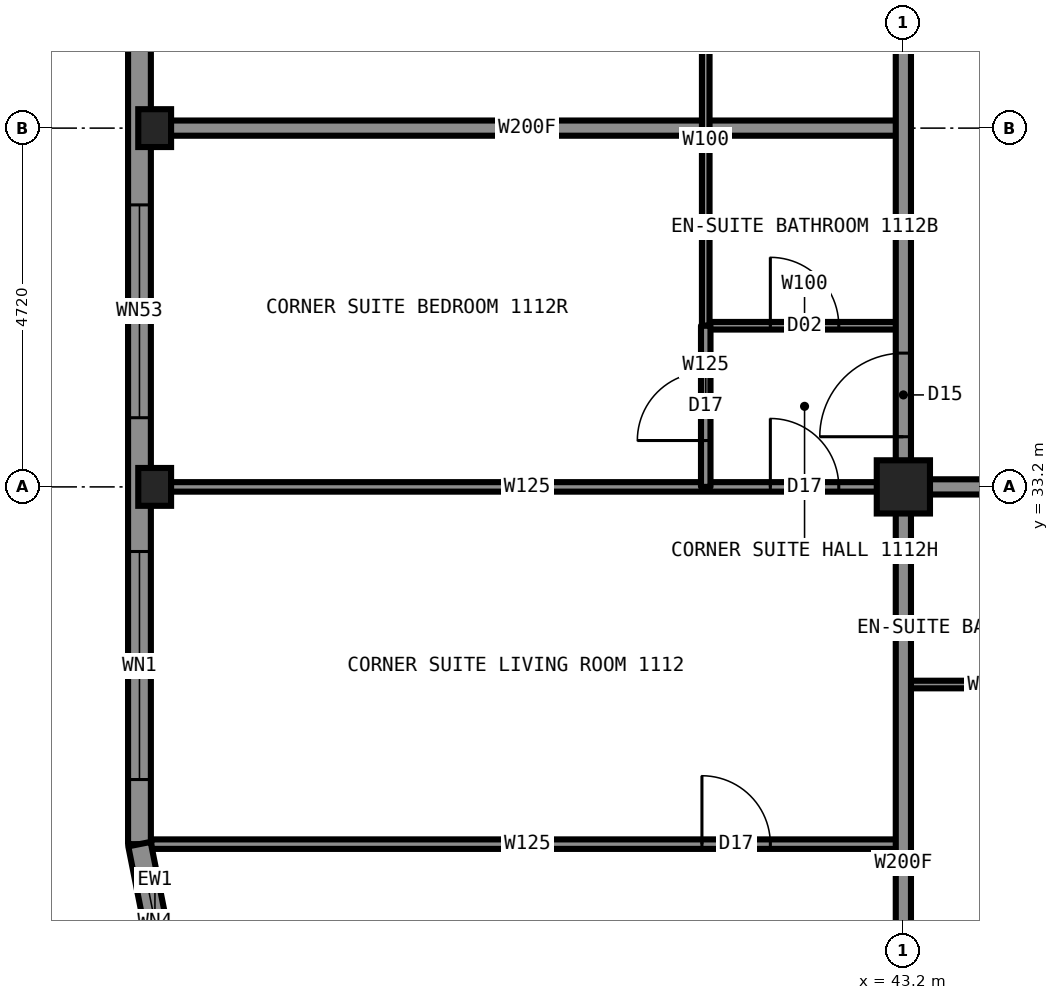
"""IFC4 building model, lengths in metres.
Left out: names, types, materials, properties, quantities, classifications, styles, units other than length and angle.
Written with IfcOpenShell. Run it as: python <this file> out.ifc"""

import sys

from ifc_helpers import new_model, si_unit, direction, frame, frame_2d, origin, origin_2d, place, context, subcontext, project, spatial, rectangle, hollow_rectangle, i_section, extrude, element, fill, save


model = new_model("IFC4")
c1 = context("Model", 3, precision=1e-05, world=origin(), true_north=direction((0.0, 1.0)))
c2 = subcontext(c1, "Body", "Model", "MODEL_VIEW")
j1 = project(units=[si_unit("LENGTHUNIT", "METRE"), si_unit("PLANEANGLEUNIT", "RADIAN")], contexts=[c1])
p1 = place(None, origin())
s1 = spatial("IfcSite", under=j1, at=p1, CompositionType="ELEMENT")
p2 = place(p1, origin())
s2 = spatial("IfcBuilding", under=s1, at=p2, CompositionType="ELEMENT")
p3 = place(p2, frame((0.0, 0.0, 39.0)))
s3 = spatial("IfcBuildingStorey", under=s2, at=p3, CompositionType="ELEMENT", Elevation=39.0)
for number, where, z_axis, x_axis in (
    (1, (33.35, 33.2, 0.0), (0.0, 0.0, 1.0), (1.0, 0.0, 0.0)),
    (2, (33.35, 37.92, 0.0), (0.0, 0.0, 1.0), (1.0, 0.0, 0.0)),
):
    element("IfcColumn", number, at=place(p3, frame(where, z_axis=z_axis, x_axis=x_axis)), inside=s3, PredefinedType="COLUMN", context=c2, shape_type="SweptSolid", body=[
        extrude(i_section(OverallWidth=0.432, OverallDepth=0.498, WebThickness=0.056, FlangeThickness=0.089, at=origin_2d()), origin(), (0.0, 0.0, 1.0), 3.5),
    ])
p4 = place(p3, frame((43.2, 33.2, 0.0), z_axis=(0.0, 0.0, 1.0), x_axis=(1.0, 0.0, 0.0)))
e3 = element("IfcColumn", 3, at=p4, inside=s3, PredefinedType="COLUMN", context=c2, shape_type="SweptSolid", body=[
    extrude(hollow_rectangle(XDim=0.7, YDim=0.7, WallThickness=0.06, at=origin_2d()), origin(), (0.0, 0.0, 1.0), 3.5),
])
p5 = place(p3, frame((43.2, 33.2, 0.0), z_axis=(0.0, 0.0, 1.0), x_axis=(1.0, 0.0, 0.0)))
e4 = element("IfcWall", 4, at=p5, inside=s3, PredefinedType="PARTITIONING", context=c2, shape_type="SweptSolid", body=[
    extrude(rectangle(XDim=23.6, YDim=0.2, at=frame_2d((11.8, 0.0))), origin(), (0.0, 0.0, 1.0), 3.33),
])
p6 = place(p5, frame((2.55, 0.0, 0.0)))
e5 = element("IfcOpeningElement", 5, at=p6, cuts=e4, PredefinedType="OPENING", context=c2, shape_type="SweptSolid", body=[
    extrude(rectangle(XDim=1.0, YDim=2.2, at=frame_2d((0.5, 1.1))), frame((0.0, 0.11, 0.0), z_axis=(0.0, -1.0, 0.0), x_axis=(1.0, 0.0, 0.0)), (0.0, 0.0, 1.0), 0.22),
])
p7 = place(p5, frame((6.57, 0.0, 0.0)))
e6 = element("IfcOpeningElement", 6, at=p7, cuts=e4, PredefinedType="OPENING", context=c2, shape_type="SweptSolid", body=[
    extrude(rectangle(XDim=1.1, YDim=2.2, at=frame_2d((0.55, 1.1))), frame((0.0, 0.11, 0.0), z_axis=(0.0, -1.0, 0.0), x_axis=(1.0, 0.0, 0.0)), (0.0, 0.0, 1.0), 0.22),
])
p8 = place(p5, frame((20.34, 0.0, 0.0)))
e7 = element("IfcOpeningElement", 7, at=p8, cuts=e4, PredefinedType="OPENING", context=c2, shape_type="SweptSolid", body=[
    extrude(rectangle(XDim=1.0, YDim=2.2, at=frame_2d((0.5, 1.1))), frame((0.0, 0.11, 0.0), z_axis=(0.0, -1.0, 0.0), x_axis=(1.0, 0.0, 0.0)), (0.0, 0.0, 1.0), 0.22),
])
p9 = place(p3, frame((33.3, 33.2, 0.0), z_axis=(0.0, 0.0, 1.0), x_axis=(1.0, 0.0, 0.0)))
e8 = element("IfcWall", 8, at=p9, inside=s3, PredefinedType="PARTITIONING", context=c2, shape_type="SweptSolid", body=[
    extrude(rectangle(XDim=9.9, YDim=0.125, at=frame_2d((4.95, 0.0))), origin(), (0.0, 0.0, 1.0), 2.573),
])
p10 = place(p9, frame((8.15, 0.0, 0.0)))
e9 = element("IfcOpeningElement", 9, at=p10, cuts=e8, PredefinedType="OPENING", context=c2, shape_type="SweptSolid", body=[
    extrude(rectangle(XDim=0.9, YDim=2.2, at=frame_2d((0.45, 1.1))), frame((0.0, 0.073, 0.0), z_axis=(0.0, -1.0, 0.0), x_axis=(1.0, 0.0, 0.0)), (0.0, 0.0, 1.0), 0.145),
])
p11 = place(p3, frame((43.2, 30.6, 0.0), z_axis=(0.0, 0.0, 1.0), x_axis=(1.0, 0.0, 0.0)))
e10 = element("IfcWall", 10, at=p11, inside=s3, PredefinedType="PARTITIONING", context=c2, shape_type="SweptSolid", body=[
    extrude(rectangle(XDim=2.3, YDim=0.1, at=frame_2d((1.15, 0.0))), origin(), (0.0, 0.0, 1.0), 3.33),
])
p12 = place(p3, frame((33.306, 28.5, 0.0), z_axis=(0.0, 0.0, 1.0), x_axis=(1.0, 0.0, 0.0)))
e11 = element("IfcWall", 11, at=p12, inside=s3, PredefinedType="PARTITIONING", context=c2, shape_type="SweptSolid", body=[
    extrude(rectangle(XDim=9.894, YDim=0.125, at=frame_2d((4.947, 0.0))), origin(), (0.0, 0.0, 1.0), 3.33),
])
p13 = place(p12, frame((7.244, 0.0, 0.0)))
e12 = element("IfcOpeningElement", 12, at=p13, cuts=e11, PredefinedType="OPENING", context=c2, shape_type="SweptSolid", body=[
    extrude(rectangle(XDim=0.9, YDim=2.2, at=frame_2d((0.45, 1.1))), frame((0.0, 0.073, 0.0), z_axis=(0.0, -1.0, 0.0), x_axis=(1.0, 0.0, 0.0)), (0.0, 0.0, 1.0), 0.145),
])
p14 = place(p3, frame((33.3, 37.92, 0.0), z_axis=(0.0, 0.0, 1.0), x_axis=(1.0, 0.0, 0.0)))
e13 = element("IfcWall", 13, at=p14, inside=s3, PredefinedType="PARTITIONING", context=c2, shape_type="SweptSolid", body=[
    extrude(rectangle(XDim=9.9, YDim=0.2, at=frame_2d((4.95, 0.0))), origin(), (0.0, 0.0, 1.0), 2.573),
])
p15 = place(p3, frame((40.6, 35.32, 0.0), z_axis=(0.0, 0.0, 1.0), x_axis=(1.0, 0.0, 0.0)))
e14 = element("IfcWall", 14, at=p15, inside=s3, PredefinedType="PARTITIONING", context=c2, shape_type="SweptSolid", body=[
    extrude(rectangle(XDim=2.6, YDim=0.1, at=frame_2d((1.3, 0.0))), origin(), (0.0, 0.0, 1.0), 3.33),
])
p16 = place(p15, frame((0.85, 0.0, 0.0)))
e15 = element("IfcOpeningElement", 15, at=p16, cuts=e14, PredefinedType="OPENING", context=c2, shape_type="SweptSolid", body=[
    extrude(rectangle(XDim=0.9, YDim=2.1, at=frame_2d((0.45, 1.05))), frame((0.0, 0.06, 0.0), z_axis=(0.0, -1.0, 0.0), x_axis=(1.0, 0.0, 0.0)), (0.0, 0.0, 1.0), 0.12),
])
p17 = place(p3, frame((43.2, 33.2, 0.0), z_axis=(0.0, 0.0, 1.0), x_axis=(0.0, 1.0, 0.0)))
e16 = element("IfcWall", 16, at=p17, inside=s3, PredefinedType="PARTITIONING", context=c2, shape_type="SweptSolid", body=[
    extrude(rectangle(XDim=23.58, YDim=0.2, at=frame_2d((11.79, 0.0))), origin(), (0.0, 0.0, 1.0), 3.33),
])
p18 = place(p17, frame((7.27, 0.0, 0.0)))
e17 = element("IfcOpeningElement", 17, at=p18, cuts=e16, PredefinedType="OPENING", context=c2, shape_type="SweptSolid", body=[
    extrude(rectangle(XDim=1.0, YDim=2.2, at=frame_2d((0.5, 1.1))), frame((0.0, 0.11, 0.0), z_axis=(0.0, -1.0, 0.0), x_axis=(1.0, 0.0, 0.0)), (0.0, 0.0, 1.0), 0.22),
])
p19 = place(p17, frame((12.44, 0.0, 0.0)))
e18 = element("IfcOpeningElement", 18, at=p19, cuts=e16, PredefinedType="OPENING", context=c2, shape_type="SweptSolid", body=[
    extrude(rectangle(XDim=1.0, YDim=2.2, at=frame_2d((0.5, 1.1))), frame((0.0, 0.11, 0.0), z_axis=(0.0, -1.0, 0.0), x_axis=(1.0, 0.0, 0.0)), (0.0, 0.0, 1.0), 0.22),
])
p20 = place(p17, frame((21.84, 0.0, 0.0)))
e19 = element("IfcOpeningElement", 19, at=p20, cuts=e16, PredefinedType="OPENING", context=c2, shape_type="SweptSolid", body=[
    extrude(rectangle(XDim=1.1, YDim=2.2, at=frame_2d((0.55, 1.1))), frame((0.0, 0.11, 0.0), z_axis=(0.0, -1.0, 0.0), x_axis=(1.0, 0.0, 0.0)), (0.0, 0.0, 1.0), 0.22),
])
p21 = place(p17, frame((0.66, 0.0, 0.0)))
e20 = element("IfcOpeningElement", 20, at=p21, cuts=e16, PredefinedType="OPENING", context=c2, shape_type="SweptSolid", body=[
    extrude(rectangle(XDim=1.1, YDim=2.2, at=frame_2d((0.55, 1.1))), frame((0.0, 0.11, 0.0), z_axis=(0.0, -1.0, 0.0), x_axis=(1.0, 0.0, 0.0)), (0.0, 0.0, 1.0), 0.22),
])
p22 = place(p3, frame((43.2, 23.3, 0.0), z_axis=(0.0, 0.0, 1.0), x_axis=(0.0, 1.0, 0.0)))
e21 = element("IfcWall", 21, at=p22, inside=s3, PredefinedType="PARTITIONING", context=c2, shape_type="SweptSolid", body=[
    extrude(rectangle(XDim=9.9, YDim=0.2, at=frame_2d((4.95, 0.0))), origin(), (0.0, 0.0, 1.0), 2.573),
])
p23 = place(p3, frame((40.6, 35.32, 0.0), z_axis=(0.0, 0.0, 1.0), x_axis=(0.0, 1.0, 0.0)))
e22 = element("IfcWall", 22, at=p23, inside=s3, PredefinedType="PARTITIONING", context=c2, shape_type="SweptSolid", body=[
    extrude(rectangle(XDim=4.9, YDim=0.1, at=frame_2d((2.45, 0.0))), origin(), (0.0, 0.0, 1.0), 3.33),
])
p24 = place(p3, frame((40.6, 33.2, 0.0), z_axis=(0.0, 0.0, 1.0), x_axis=(0.0, 1.0, 0.0)))
e23 = element("IfcWall", 23, at=p24, inside=s3, PredefinedType="PARTITIONING", context=c2, shape_type="SweptSolid", body=[
    extrude(rectangle(XDim=2.12, YDim=0.125, at=frame_2d((1.06, 0.0))), origin(), (0.0, 0.0, 1.0), 3.33),
])
p25 = place(p24, frame((0.61, 0.0, 0.0)))
e24 = element("IfcOpeningElement", 24, at=p25, cuts=e23, PredefinedType="OPENING", context=c2, shape_type="SweptSolid", body=[
    extrude(rectangle(XDim=0.9, YDim=2.2, at=frame_2d((0.45, 1.1))), frame((0.0, 0.073, 0.0), z_axis=(0.0, -1.0, 0.0), x_axis=(1.0, 0.0, 0.0)), (0.0, 0.0, 1.0), 0.145),
])
p26 = place(p3, frame((33.15, 61.5, 0.0), z_axis=(0.0, 0.0, 1.0), x_axis=(0.0, -1.0, 0.0)))
e25 = element("IfcWall", 25, at=p26, inside=s3, PredefinedType="SOLIDWALL", context=c2, shape_type="SweptSolid", body=[
    extrude(rectangle(XDim=33.0, YDim=0.3, at=frame_2d((16.5, 0.0))), origin(), (0.0, 0.0, 1.0), 2.83),
])
p27 = place(p26, frame((0.85, 0.0, 0.5)))
e26 = element("IfcOpeningElement", 26, at=p27, cuts=e25, PredefinedType="OPENING", context=c2, shape_type="SweptSolid", body=[
    extrude(rectangle(XDim=2.5, YDim=2.0, at=frame_2d((1.25, 1.0))), frame((0.0, 0.16, 0.0), z_axis=(0.0, -1.0, 0.0), x_axis=(1.0, 0.0, 0.0)), (0.0, 0.0, 1.0), 0.32),
])
p28 = place(p26, frame((6.61, 0.0, 0.5)))
e27 = element("IfcOpeningElement", 27, at=p28, cuts=e25, PredefinedType="OPENING", context=c2, shape_type="SweptSolid", body=[
    extrude(rectangle(XDim=1.9, YDim=1.9, at=frame_2d((0.95, 0.95))), frame((0.0, 0.16, 0.0), z_axis=(0.0, -1.0, 0.0), x_axis=(1.0, 0.0, 0.0)), (0.0, 0.0, 1.0), 0.32),
])
p29 = place(p26, frame((10.28, 0.0, 0.5)))
e28 = element("IfcOpeningElement", 28, at=p29, cuts=e25, PredefinedType="OPENING", context=c2, shape_type="SweptSolid", body=[
    extrude(rectangle(XDim=3.0, YDim=2.0, at=frame_2d((1.5, 1.0))), frame((0.0, 0.16, 0.0), z_axis=(0.0, -1.0, 0.0), x_axis=(1.0, 0.0, 0.0)), (0.0, 0.0, 1.0), 0.32),
])
p30 = place(p26, frame((15.0, 0.0, 0.5)))
e29 = element("IfcOpeningElement", 29, at=p30, cuts=e25, PredefinedType="OPENING", context=c2, shape_type="SweptSolid", body=[
    extrude(rectangle(XDim=3.0, YDim=2.0, at=frame_2d((1.5, 1.0))), frame((0.0, 0.16, 0.0), z_axis=(0.0, -1.0, 0.0), x_axis=(1.0, 0.0, 0.0)), (0.0, 0.0, 1.0), 0.32),
])
p31 = place(p26, frame((19.72, 0.0, 0.5)))
e30 = element("IfcOpeningElement", 30, at=p31, cuts=e25, PredefinedType="OPENING", context=c2, shape_type="SweptSolid", body=[
    extrude(rectangle(XDim=3.0, YDim=2.0, at=frame_2d((1.5, 1.0))), frame((0.0, 0.16, 0.0), z_axis=(0.0, -1.0, 0.0), x_axis=(1.0, 0.0, 0.0)), (0.0, 0.0, 1.0), 0.32),
])
p32 = place(p26, frame((24.44, 0.0, 0.5)))
e31 = element("IfcOpeningElement", 31, at=p32, cuts=e25, PredefinedType="OPENING", context=c2, shape_type="SweptSolid", body=[
    extrude(rectangle(XDim=1.9, YDim=1.9, at=frame_2d((0.95, 0.95))), frame((0.0, 0.16, 0.0), z_axis=(0.0, -1.0, 0.0), x_axis=(1.0, 0.0, 0.0)), (0.0, 0.0, 1.0), 0.32),
])
p33 = place(p26, frame((29.6, 0.0, 0.5)))
e32 = element("IfcOpeningElement", 32, at=p33, cuts=e25, PredefinedType="OPENING", context=c2, shape_type="SweptSolid", body=[
    extrude(rectangle(XDim=2.5, YDim=2.0, at=frame_2d((1.25, 1.0))), frame((0.0, 0.16, 0.0), z_axis=(0.0, -1.0, 0.0), x_axis=(1.0, 0.0, 0.0)), (0.0, 0.0, 1.0), 0.32),
])
p34 = place(p26, frame((5.91, 0.0, 0.5)))
e33 = element("IfcOpeningElement", 33, at=p34, cuts=e25, PredefinedType="OPENING", context=c2, shape_type="SweptSolid", body=[
    extrude(rectangle(XDim=0.7, YDim=1.0, at=frame_2d((0.35, 0.5))), frame((0.0, 0.16, 0.0), z_axis=(0.0, -1.0, 0.0), x_axis=(1.0, 0.0, 0.0)), (0.0, 0.0, 1.0), 0.32),
])
p35 = place(p26, frame((26.39, 0.0, 0.5)))
e34 = element("IfcOpeningElement", 34, at=p35, cuts=e25, PredefinedType="OPENING", context=c2, shape_type="SweptSolid", body=[
    extrude(rectangle(XDim=0.7, YDim=1.0, at=frame_2d((0.35, 0.5))), frame((0.0, 0.16, 0.0), z_axis=(0.0, -1.0, 0.0), x_axis=(1.0, 0.0, 0.0)), (0.0, 0.0, 1.0), 0.32),
])
p36 = place(p3, frame((33.15, 28.5, 0.0), z_axis=(0.0, 0.0, 1.0), x_axis=(0.195081421501, -0.980787050784, 0.0)))
e35 = element("IfcWall", 35, at=p36, inside=s3, PredefinedType="SOLIDWALL", context=c2, shape_type="SweptSolid", body=[
    extrude(rectangle(XDim=2.087, YDim=0.3, at=frame_2d((1.044, 0.0))), origin(), (0.0, 0.0, 1.0), 3.33),
])
p37 = place(p36, frame((0.444, 0.0, 0.5)))
e36 = element("IfcOpeningElement", 36, at=p37, cuts=e35, PredefinedType="OPENING", context=c2, shape_type="SweptSolid", body=[
    extrude(rectangle(XDim=1.2, YDim=2.0, at=frame_2d((0.6, 1.0))), frame((0.0, 0.16, 0.0), z_axis=(0.0, -1.0, 0.0), x_axis=(1.0, 0.0, 0.0)), (0.0, 0.0, 1.0), 0.32),
])
p38 = place(p10, origin())
e37 = element("IfcDoor", 37, at=p38, inside=s3, OperationType="SINGLE_SWING_LEFT", PredefinedType="DOOR", context=c2, shape_type="SweptSolid", body=[
    extrude(rectangle(XDim=0.9, YDim=2.2, at=frame_2d((0.45, 1.1))), frame((0.0, 0.025, 0.0), z_axis=(0.0, -1.0, 0.0), x_axis=(1.0, 0.0, 0.0)), (0.0, 0.0, 1.0), 0.05),
])
fill(e9, e37)
p39 = place(p16, origin())
e38 = element("IfcDoor", 38, at=p39, inside=s3, OperationType="SINGLE_SWING_RIGHT", PredefinedType="DOOR", context=c2, shape_type="SweptSolid", body=[
    extrude(rectangle(XDim=0.9, YDim=2.1, at=frame_2d((0.45, 1.05))), frame((0.0, 0.025, 0.0), z_axis=(0.0, -1.0, 0.0), x_axis=(1.0, 0.0, 0.0)), (0.0, 0.0, 1.0), 0.05),
])
fill(e15, e38)
p40 = place(p21, origin())
e39 = element("IfcDoor", 39, at=p40, inside=s3, OperationType="SINGLE_SWING_LEFT", PredefinedType="DOOR", context=c2, shape_type="SweptSolid", body=[
    extrude(rectangle(XDim=1.1, YDim=2.2, at=frame_2d((0.55, 1.1))), frame((0.0, 0.025, 0.0), z_axis=(0.0, -1.0, 0.0), x_axis=(1.0, 0.0, 0.0)), (0.0, 0.0, 1.0), 0.05),
])
fill(e20, e39)
p41 = place(p13, origin())
e40 = element("IfcDoor", 40, at=p41, inside=s3, OperationType="SINGLE_SWING_LEFT", PredefinedType="DOOR", context=c2, shape_type="SweptSolid", body=[
    extrude(rectangle(XDim=0.9, YDim=2.2, at=frame_2d((0.45, 1.1))), frame((0.0, 0.025, 0.0), z_axis=(0.0, -1.0, 0.0), x_axis=(1.0, 0.0, 0.0)), (0.0, 0.0, 1.0), 0.05),
])
fill(e12, e40)
p42 = place(p25, origin())
e41 = element("IfcDoor", 41, at=p42, inside=s3, OperationType="SINGLE_SWING_LEFT", PredefinedType="DOOR", context=c2, shape_type="SweptSolid", body=[
    extrude(rectangle(XDim=0.9, YDim=2.2, at=frame_2d((0.45, 1.1))), frame((0.0, 0.025, 0.0), z_axis=(0.0, -1.0, 0.0), x_axis=(1.0, 0.0, 0.0)), (0.0, 0.0, 1.0), 0.05),
])
fill(e24, e41)
p43 = place(p31, origin())
e42 = element("IfcWindow", 42, at=p43, inside=s3, PartitioningType="SINGLE_PANEL", PredefinedType="WINDOW", context=c2, shape_type="SweptSolid", body=[
    extrude(rectangle(XDim=3.0, YDim=2.0, at=frame_2d((1.5, 1.0))), frame((0.0, 0.03, 0.0), z_axis=(0.0, -1.0, 0.0), x_axis=(1.0, 0.0, 0.0)), (0.0, 0.0, 1.0), 0.06),
])
fill(e30, e42)
p44 = place(p32, origin())
e43 = element("IfcWindow", 43, at=p44, inside=s3, PartitioningType="SINGLE_PANEL", PredefinedType="WINDOW", context=c2, shape_type="SweptSolid", body=[
    extrude(rectangle(XDim=1.9, YDim=1.9, at=frame_2d((0.95, 0.95))), frame((0.0, 0.03, 0.0), z_axis=(0.0, -1.0, 0.0), x_axis=(1.0, 0.0, 0.0)), (0.0, 0.0, 1.0), 0.06),
])
fill(e31, e43)
p45 = place(p33, origin())
e44 = element("IfcWindow", 44, at=p45, inside=s3, PartitioningType="SINGLE_PANEL", PredefinedType="WINDOW", context=c2, shape_type="SweptSolid", body=[
    extrude(rectangle(XDim=2.5, YDim=2.0, at=frame_2d((1.25, 1.0))), frame((0.0, 0.03, 0.0), z_axis=(0.0, -1.0, 0.0), x_axis=(1.0, 0.0, 0.0)), (0.0, 0.0, 1.0), 0.06),
])
fill(e32, e44)
p46 = place(p37, origin())
e45 = element("IfcWindow", 45, at=p46, inside=s3, PartitioningType="SINGLE_PANEL", PredefinedType="WINDOW", context=c2, shape_type="SweptSolid", body=[
    extrude(rectangle(XDim=1.2, YDim=2.0, at=frame_2d((0.6, 1.0))), frame((0.0, 0.03, 0.0), z_axis=(0.0, -1.0, 0.0), x_axis=(1.0, 0.0, 0.0)), (0.0, 0.0, 1.0), 0.06),
])
fill(e36, e45)
p47 = place(p35, origin())
e46 = element("IfcWindow", 46, at=p47, inside=s3, PartitioningType="SINGLE_PANEL", PredefinedType="WINDOW", context=c2, shape_type="SweptSolid", body=[
    extrude(rectangle(XDim=0.7, YDim=1.0, at=frame_2d((0.35, 0.5))), frame((0.0, 0.03, 0.0), z_axis=(0.0, -1.0, 0.0), x_axis=(1.0, 0.0, 0.0)), (0.0, 0.0, 1.0), 0.06),
])
fill(e34, e46)
save(model, sys.argv[1])
